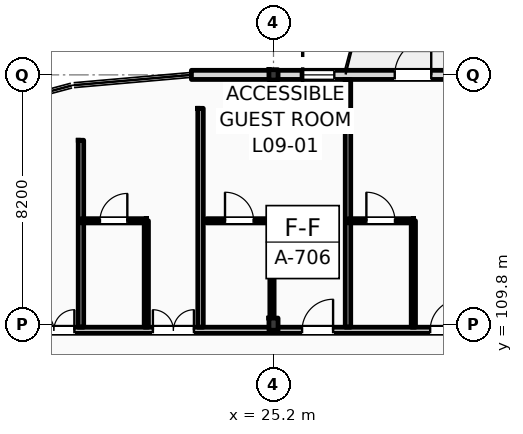
"""IFC4 building model, lengths in metres.
Left out: names, types, materials, properties, quantities, classifications, styles, units other than length and angle.
Written with IfcOpenShell. Run it as: python <this file> out.ifc"""

import sys

from ifc_helpers import new_model, si_unit, direction, frame, frame_2d, origin, origin_2d, place, context, subcontext, project, spatial, rectangle, i_section, extrude, element, fill, save


model = new_model("IFC4")
c1 = context("Model", 3, precision=1e-05, world=origin(), true_north=direction((0.0, 1.0)))
c2 = subcontext(c1, "Body", "Model", "MODEL_VIEW")
j1 = project(units=[si_unit("LENGTHUNIT", "METRE"), si_unit("PLANEANGLEUNIT", "RADIAN")], contexts=[c1])
p1 = place(None, origin())
s1 = spatial("IfcSite", under=j1, at=p1, CompositionType="ELEMENT")
p2 = place(p1, origin())
s2 = spatial("IfcBuilding", under=s1, at=p2, CompositionType="ELEMENT")
p3 = place(p2, frame((0.0, 0.0, 39.0)))
s3 = spatial("IfcBuildingStorey", under=s2, at=p3, CompositionType="ELEMENT", Elevation=39.0)
p4 = place(p3, frame((25.2, 109.8, 0.0), z_axis=(0.0, 0.0, 1.0), x_axis=(1.0, 0.0, 0.0)))
e1 = element("IfcColumn", 1, at=p4, inside=s3, PredefinedType="COLUMN", context=c2, shape_type="SweptSolid", body=[
    extrude(i_section(OverallWidth=0.3, OverallDepth=0.4, WebThickness=0.013, FlangeThickness=0.024, FilletRadius=0.027, at=origin_2d()), origin(), (0.0, 0.0, 1.0), 3.6),
])
p5 = place(p3, frame((25.2, 118.0, 0.0), z_axis=(0.0, 0.0, 1.0), x_axis=(1.0, 0.0, 0.0)))
e2 = element("IfcColumn", 2, at=p5, inside=s3, PredefinedType="COLUMN", context=c2, shape_type="SweptSolid", body=[
    extrude(i_section(OverallWidth=0.3, OverallDepth=0.34, WebThickness=0.012, FlangeThickness=0.021, FilletRadius=0.027, at=origin_2d()), origin(), (0.0, 0.0, 1.0), 3.6),
])
p6 = place(p3, frame((22.5, 118.0, 0.0), z_axis=(0.0, 0.0, 1.0), x_axis=(1.0, 0.0, 0.0)))
e3 = element("IfcWall", 3, at=p6, inside=s3, PredefinedType="STANDARD", context=c2, shape_type="SweptSolid", body=[
    extrude(rectangle(XDim=72.9, YDim=0.3, at=frame_2d((36.45, 0.0))), origin(), (0.0, 0.0, 1.0), 2.92),
])
p7 = place(p6, frame((3.6, 0.0, 0.9)))
e4 = element("IfcOpeningElement", 4, at=p7, cuts=e3, PredefinedType="OPENING", context=c2, shape_type="SweptSolid", body=[
    extrude(rectangle(XDim=1.1, YDim=1.6, at=frame_2d((0.55, 0.8))), frame((0.0, 0.16, 0.0), z_axis=(0.0, -1.0, 0.0), x_axis=(1.0, 0.0, 0.0)), (0.0, 0.0, 1.0), 0.32),
])
p8 = place(p6, frame((6.688, 0.0, 0.0)))
e5 = element("IfcOpeningElement", 5, at=p8, cuts=e3, PredefinedType="OPENING", context=c2, shape_type="SweptSolid", body=[
    extrude(rectangle(XDim=1.2, YDim=2.25, at=frame_2d((0.6, 1.125))), frame((0.0, 0.16, 0.0), z_axis=(0.0, -1.0, 0.0), x_axis=(1.0, 0.0, 0.0)), (0.0, 0.0, 1.0), 0.32),
])
p9 = place(p6, frame((11.388, 0.0, 0.9)))
e6 = element("IfcOpeningElement", 6, at=p9, cuts=e3, PredefinedType="OPENING", context=c2, shape_type="SweptSolid", body=[
    extrude(rectangle(XDim=1.6, YDim=1.75, at=frame_2d((0.8, 0.875))), frame((0.0, 0.16, 0.0), z_axis=(0.0, -1.0, 0.0), x_axis=(1.0, 0.0, 0.0)), (0.0, 0.0, 1.0), 0.32),
])
p10 = place(p6, frame((15.413, 0.0, 0.9)))
e7 = element("IfcOpeningElement", 7, at=p10, cuts=e3, PredefinedType="OPENING", context=c2, shape_type="SweptSolid", body=[
    extrude(rectangle(XDim=1.75, YDim=1.84, at=frame_2d((0.875, 0.92))), frame((0.0, 0.16, 0.0), z_axis=(0.0, -1.0, 0.0), x_axis=(1.0, 0.0, 0.0)), (0.0, 0.0, 1.0), 0.32),
])
p11 = place(p6, frame((21.245, 0.0, 0.0)))
e8 = element("IfcOpeningElement", 8, at=p11, cuts=e3, PredefinedType="OPENING", context=c2, shape_type="SweptSolid", body=[
    extrude(rectangle(XDim=1.2, YDim=2.25, at=frame_2d((0.6, 1.125))), frame((0.0, 0.16, 0.0), z_axis=(0.0, -1.0, 0.0), x_axis=(1.0, 0.0, 0.0)), (0.0, 0.0, 1.0), 0.32),
])
p12 = place(p6, frame((23.705, 0.0, 0.0)))
e9 = element("IfcOpeningElement", 9, at=p12, cuts=e3, PredefinedType="OPENING", context=c2, shape_type="SweptSolid", body=[
    extrude(rectangle(XDim=1.2, YDim=2.25, at=frame_2d((0.6, 1.125))), frame((0.0, 0.16, 0.0), z_axis=(0.0, -1.0, 0.0), x_axis=(1.0, 0.0, 0.0)), (0.0, 0.0, 1.0), 0.32),
])
p13 = place(p6, frame((28.488, 0.0, 0.9)))
e10 = element("IfcOpeningElement", 10, at=p13, cuts=e3, PredefinedType="OPENING", context=c2, shape_type="SweptSolid", body=[
    extrude(rectangle(XDim=2.6, YDim=1.84, at=frame_2d((1.3, 0.92))), frame((0.0, 0.16, 0.0), z_axis=(0.0, -1.0, 0.0), x_axis=(1.0, 0.0, 0.0)), (0.0, 0.0, 1.0), 0.32),
])
p14 = place(p6, frame((34.76, 0.0, 0.9)))
e11 = element("IfcOpeningElement", 11, at=p14, cuts=e3, PredefinedType="OPENING", context=c2, shape_type="SweptSolid", body=[
    extrude(rectangle(XDim=1.1, YDim=1.84, at=frame_2d((0.55, 0.92))), frame((0.0, 0.16, 0.0), z_axis=(0.0, -1.0, 0.0), x_axis=(1.0, 0.0, 0.0)), (0.0, 0.0, 1.0), 0.32),
])
p15 = place(p6, frame((38.143, 0.0, 0.0)))
e12 = element("IfcOpeningElement", 12, at=p15, cuts=e3, PredefinedType="OPENING", context=c2, shape_type="SweptSolid", body=[
    extrude(rectangle(XDim=1.2, YDim=2.25, at=frame_2d((0.6, 1.125))), frame((0.0, 0.16, 0.0), z_axis=(0.0, -1.0, 0.0), x_axis=(1.0, 0.0, 0.0)), (0.0, 0.0, 1.0), 0.32),
])
p16 = place(p6, frame((42.687, 0.0, 0.9)))
e13 = element("IfcOpeningElement", 13, at=p16, cuts=e3, PredefinedType="OPENING", context=c2, shape_type="SweptSolid", body=[
    extrude(rectangle(XDim=1.2, YDim=1.8, at=frame_2d((0.6, 0.9))), frame((0.0, 0.16, 0.0), z_axis=(0.0, -1.0, 0.0), x_axis=(1.0, 0.0, 0.0)), (0.0, 0.0, 1.0), 0.32),
])
p17 = place(p6, frame((47.112, 0.0, 0.9)))
e14 = element("IfcOpeningElement", 14, at=p17, cuts=e3, PredefinedType="OPENING", context=c2, shape_type="SweptSolid", body=[
    extrude(rectangle(XDim=1.35, YDim=1.84, at=frame_2d((0.675, 0.92))), frame((0.0, 0.16, 0.0), z_axis=(0.0, -1.0, 0.0), x_axis=(1.0, 0.0, 0.0)), (0.0, 0.0, 1.0), 0.32),
])
p18 = place(p6, frame((52.482, 0.0, 0.0)))
e15 = element("IfcOpeningElement", 15, at=p18, cuts=e3, PredefinedType="OPENING", context=c2, shape_type="SweptSolid", body=[
    extrude(rectangle(XDim=1.2, YDim=2.25, at=frame_2d((0.6, 1.125))), frame((0.0, 0.16, 0.0), z_axis=(0.0, -1.0, 0.0), x_axis=(1.0, 0.0, 0.0)), (0.0, 0.0, 1.0), 0.32),
])
p19 = place(p6, frame((54.942, 0.0, 0.0)))
e16 = element("IfcOpeningElement", 16, at=p19, cuts=e3, PredefinedType="OPENING", context=c2, shape_type="SweptSolid", body=[
    extrude(rectangle(XDim=1.2, YDim=2.25, at=frame_2d((0.6, 1.125))), frame((0.0, 0.16, 0.0), z_axis=(0.0, -1.0, 0.0), x_axis=(1.0, 0.0, 0.0)), (0.0, 0.0, 1.0), 0.32),
])
p20 = place(p6, frame((60.387, 0.0, 0.9)))
e17 = element("IfcOpeningElement", 17, at=p20, cuts=e3, PredefinedType="OPENING", context=c2, shape_type="SweptSolid", body=[
    extrude(rectangle(XDim=1.8, YDim=1.84, at=frame_2d((0.9, 0.92))), frame((0.0, 0.16, 0.0), z_axis=(0.0, -1.0, 0.0), x_axis=(1.0, 0.0, 0.0)), (0.0, 0.0, 1.0), 0.32),
])
p21 = place(p6, frame((66.013, 0.0, 0.9)))
e18 = element("IfcOpeningElement", 18, at=p21, cuts=e3, PredefinedType="OPENING", context=c2, shape_type="SweptSolid", body=[
    extrude(rectangle(XDim=1.35, YDim=1.84, at=frame_2d((0.675, 0.92))), frame((0.0, 0.16, 0.0), z_axis=(0.0, -1.0, 0.0), x_axis=(1.0, 0.0, 0.0)), (0.0, 0.0, 1.0), 0.32),
])
p22 = place(p6, frame((69.275, 0.0, 0.9)))
e19 = element("IfcOpeningElement", 19, at=p22, cuts=e3, PredefinedType="OPENING", context=c2, shape_type="SweptSolid", body=[
    extrude(rectangle(XDim=2.1, YDim=1.84, at=frame_2d((1.05, 0.92))), frame((0.0, 0.16, 0.0), z_axis=(0.0, -1.0, 0.0), x_axis=(1.0, 0.0, 0.0)), (0.0, 0.0, 1.0), 0.32),
])
p23 = place(p3, frame((10.65, 109.6, 0.0), z_axis=(0.0, 0.0, 1.0), x_axis=(1.0, 0.0, 0.0)))
e20 = element("IfcWall", 20, at=p23, inside=s3, PredefinedType="PARTITIONING", context=c2, shape_type="SweptSolid", body=[
    extrude(rectangle(XDim=84.61, YDim=0.2, at=frame_2d((42.305, 0.0))), origin(), (0.0, 0.0, 1.0), 2.82),
])
p24 = place(p23, frame((15.49, 0.0, 0.0)))
e21 = element("IfcOpeningElement", 21, at=p24, cuts=e20, PredefinedType="OPENING", context=c2, shape_type="SweptSolid", body=[
    extrude(rectangle(XDim=1.02, YDim=2.2, at=frame_2d((0.51, 1.1))), frame((0.0, 0.11, 0.0), z_axis=(0.0, -1.0, 0.0), x_axis=(1.0, 0.0, 0.0)), (0.0, 0.0, 1.0), 0.22),
])
p25 = place(p23, frame((19.703, 0.0, 0.0)))
e22 = element("IfcOpeningElement", 22, at=p25, cuts=e20, PredefinedType="OPENING", context=c2, shape_type="SweptSolid", body=[
    extrude(rectangle(XDim=1.02, YDim=2.2, at=frame_2d((0.51, 1.1))), frame((0.0, 0.11, 0.0), z_axis=(0.0, -1.0, 0.0), x_axis=(1.0, 0.0, 0.0)), (0.0, 0.0, 1.0), 0.22),
])
p26 = place(p23, frame((24.203, 0.0, 0.0)))
e23 = element("IfcOpeningElement", 23, at=p26, cuts=e20, PredefinedType="OPENING", context=c2, shape_type="SweptSolid", body=[
    extrude(rectangle(XDim=1.02, YDim=2.2, at=frame_2d((0.51, 1.1))), frame((0.0, 0.11, 0.0), z_axis=(0.0, -1.0, 0.0), x_axis=(1.0, 0.0, 0.0)), (0.0, 0.0, 1.0), 0.22),
])
p27 = place(p23, frame((26.552, 0.0, 0.0)))
e24 = element("IfcOpeningElement", 24, at=p27, cuts=e20, PredefinedType="OPENING", context=c2, shape_type="SweptSolid", body=[
    extrude(rectangle(XDim=1.02, YDim=2.2, at=frame_2d((0.51, 1.1))), frame((0.0, 0.11, 0.0), z_axis=(0.0, -1.0, 0.0), x_axis=(1.0, 0.0, 0.0)), (0.0, 0.0, 1.0), 0.22),
])
p28 = place(p23, frame((33.233, 0.0, 0.0)))
e25 = element("IfcOpeningElement", 25, at=p28, cuts=e20, PredefinedType="OPENING", context=c2, shape_type="SweptSolid", body=[
    extrude(rectangle(XDim=0.96, YDim=2.2, at=frame_2d((0.48, 1.1))), frame((0.0, 0.11, 0.0), z_axis=(0.0, -1.0, 0.0), x_axis=(1.0, 0.0, 0.0)), (0.0, 0.0, 1.0), 0.22),
])
p29 = place(p23, frame((35.583, 0.0, 0.0)))
e26 = element("IfcOpeningElement", 26, at=p29, cuts=e20, PredefinedType="OPENING", context=c2, shape_type="SweptSolid", body=[
    extrude(rectangle(XDim=0.96, YDim=2.2, at=frame_2d((0.48, 1.1))), frame((0.0, 0.11, 0.0), z_axis=(0.0, -1.0, 0.0), x_axis=(1.0, 0.0, 0.0)), (0.0, 0.0, 1.0), 0.22),
])
p30 = place(p23, frame((42.233, 0.0, 0.0)))
e27 = element("IfcOpeningElement", 27, at=p30, cuts=e20, PredefinedType="OPENING", context=c2, shape_type="SweptSolid", body=[
    extrude(rectangle(XDim=0.96, YDim=2.2, at=frame_2d((0.48, 1.1))), frame((0.0, 0.11, 0.0), z_axis=(0.0, -1.0, 0.0), x_axis=(1.0, 0.0, 0.0)), (0.0, 0.0, 1.0), 0.22),
])
p31 = place(p23, frame((46.983, 0.0, 0.0)))
e28 = element("IfcOpeningElement", 28, at=p31, cuts=e20, PredefinedType="OPENING", context=c2, shape_type="SweptSolid", body=[
    extrude(rectangle(XDim=0.96, YDim=2.2, at=frame_2d((0.48, 1.1))), frame((0.0, 0.11, 0.0), z_axis=(0.0, -1.0, 0.0), x_axis=(1.0, 0.0, 0.0)), (0.0, 0.0, 1.0), 0.22),
])
p32 = place(p23, frame((51.233, 0.0, 0.0)))
e29 = element("IfcOpeningElement", 29, at=p32, cuts=e20, PredefinedType="OPENING", context=c2, shape_type="SweptSolid", body=[
    extrude(rectangle(XDim=0.96, YDim=2.2, at=frame_2d((0.48, 1.1))), frame((0.0, 0.11, 0.0), z_axis=(0.0, -1.0, 0.0), x_axis=(1.0, 0.0, 0.0)), (0.0, 0.0, 1.0), 0.22),
])
p33 = place(p23, frame((55.733, 0.0, 0.0)))
e30 = element("IfcOpeningElement", 30, at=p33, cuts=e20, PredefinedType="OPENING", context=c2, shape_type="SweptSolid", body=[
    extrude(rectangle(XDim=0.96, YDim=2.2, at=frame_2d((0.48, 1.1))), frame((0.0, 0.11, 0.0), z_axis=(0.0, -1.0, 0.0), x_axis=(1.0, 0.0, 0.0)), (0.0, 0.0, 1.0), 0.22),
])
p34 = place(p23, frame((58.083, 0.0, 0.0)))
e31 = element("IfcOpeningElement", 31, at=p34, cuts=e20, PredefinedType="OPENING", context=c2, shape_type="SweptSolid", body=[
    extrude(rectangle(XDim=0.96, YDim=2.2, at=frame_2d((0.48, 1.1))), frame((0.0, 0.11, 0.0), z_axis=(0.0, -1.0, 0.0), x_axis=(1.0, 0.0, 0.0)), (0.0, 0.0, 1.0), 0.22),
])
p35 = place(p23, frame((64.732, 0.0, 0.0)))
e32 = element("IfcOpeningElement", 32, at=p35, cuts=e20, PredefinedType="OPENING", context=c2, shape_type="SweptSolid", body=[
    extrude(rectangle(XDim=0.96, YDim=2.2, at=frame_2d((0.48, 1.1))), frame((0.0, 0.11, 0.0), z_axis=(0.0, -1.0, 0.0), x_axis=(1.0, 0.0, 0.0)), (0.0, 0.0, 1.0), 0.22),
])
p36 = place(p23, frame((66.832, 0.0, 0.0)))
e33 = element("IfcOpeningElement", 33, at=p36, cuts=e20, PredefinedType="OPENING", context=c2, shape_type="SweptSolid", body=[
    extrude(rectangle(XDim=0.96, YDim=2.2, at=frame_2d((0.48, 1.1))), frame((0.0, 0.11, 0.0), z_axis=(0.0, -1.0, 0.0), x_axis=(1.0, 0.0, 0.0)), (0.0, 0.0, 1.0), 0.22),
])
p37 = place(p23, frame((73.732, 0.0, 0.0)))
e34 = element("IfcOpeningElement", 34, at=p37, cuts=e20, PredefinedType="OPENING", context=c2, shape_type="SweptSolid", body=[
    extrude(rectangle(XDim=0.96, YDim=2.2, at=frame_2d((0.48, 1.1))), frame((0.0, 0.11, 0.0), z_axis=(0.0, -1.0, 0.0), x_axis=(1.0, 0.0, 0.0)), (0.0, 0.0, 1.0), 0.22),
])
p38 = place(p23, frame((78.233, 0.0, 0.0)))
e35 = element("IfcOpeningElement", 35, at=p38, cuts=e20, PredefinedType="OPENING", context=c2, shape_type="SweptSolid", body=[
    extrude(rectangle(XDim=0.96, YDim=2.2, at=frame_2d((0.48, 1.1))), frame((0.0, 0.11, 0.0), z_axis=(0.0, -1.0, 0.0), x_axis=(1.0, 0.0, 0.0)), (0.0, 0.0, 1.0), 0.22),
])
p39 = place(p23, frame((80.62, 0.0, 0.0)))
e36 = element("IfcOpeningElement", 36, at=p39, cuts=e20, PredefinedType="OPENING", context=c2, shape_type="SweptSolid", body=[
    extrude(rectangle(XDim=0.96, YDim=2.2, at=frame_2d((0.48, 1.1))), frame((0.0, 0.11, 0.0), z_axis=(0.0, -1.0, 0.0), x_axis=(1.0, 0.0, 0.0)), (0.0, 0.0, 1.0), 0.22),
])
p40 = place(p23, frame((2.716, 0.0, 0.0)))
e37 = element("IfcOpeningElement", 37, at=p40, cuts=e20, PredefinedType="OPENING", context=c2, shape_type="SweptSolid", body=[
    extrude(rectangle(XDim=1.35, YDim=2.25, at=frame_2d((0.675, 1.125))), frame((0.0, 0.11, 0.0), z_axis=(0.0, -1.0, 0.0), x_axis=(1.0, 0.0, 0.0)), (0.0, 0.0, 1.0), 0.22),
])
p41 = place(p23, frame((6.65, 0.0, 0.0)))
e38 = element("IfcOpeningElement", 38, at=p41, cuts=e20, PredefinedType="OPENING", context=c2, shape_type="SweptSolid", body=[
    extrude(rectangle(XDim=1.35, YDim=2.25, at=frame_2d((0.675, 1.125))), frame((0.0, 0.11, 0.0), z_axis=(0.0, -1.0, 0.0), x_axis=(1.0, 0.0, 0.0)), (0.0, 0.0, 1.0), 0.22),
])
p42 = place(p23, frame((10.583, 0.0, 0.0)))
e39 = element("IfcOpeningElement", 39, at=p42, cuts=e20, PredefinedType="OPENING", context=c2, shape_type="SweptSolid", body=[
    extrude(rectangle(XDim=1.35, YDim=2.25, at=frame_2d((0.675, 1.125))), frame((0.0, 0.11, 0.0), z_axis=(0.0, -1.0, 0.0), x_axis=(1.0, 0.0, 0.0)), (0.0, 0.0, 1.0), 0.22),
])
p43 = place(p3, frame((27.65, 109.7, 0.0), z_axis=(0.0, 0.0, 1.0), x_axis=(0.0, 1.0, 0.0)))
e40 = element("IfcWall", 40, at=p43, inside=s3, PredefinedType="PARTITIONING", context=c2, shape_type="SweptSolid", body=[
    extrude(rectangle(XDim=8.15, YDim=0.18, at=frame_2d((4.075, 0.0))), origin(), (0.0, 0.0, 1.0), 3.07),
])
p44 = place(p3, frame((25.15, 109.7, 0.0), z_axis=(0.0, 0.0, 1.0), x_axis=(0.0, 1.0, 0.0)))
e41 = element("IfcWall", 41, at=p44, inside=s3, PredefinedType="PARTITIONING", context=c2, shape_type="SweptSolid", body=[
    extrude(rectangle(XDim=3.5, YDim=0.14, at=frame_2d((1.75, 0.0))), origin(), (0.0, 0.0, 1.0), 3.01),
])
p45 = place(p3, frame((23.0, 113.2, 0.0), z_axis=(0.0, 0.0, 1.0), x_axis=(1.0, 0.0, 0.0)))
e42 = element("IfcWall", 42, at=p45, inside=s3, PredefinedType="PARTITIONING", context=c2, shape_type="SweptSolid", body=[
    extrude(rectangle(XDim=2.15, YDim=0.14, at=frame_2d((1.075, 0.0))), origin(), (0.0, 0.0, 1.0), 3.38),
])
p46 = place(p45, frame((0.605, 0.0, 0.0)))
e43 = element("IfcOpeningElement", 43, at=p46, cuts=e42, PredefinedType="OPENING", context=c2, shape_type="SweptSolid", body=[
    extrude(rectangle(XDim=0.94, YDim=2.15, at=frame_2d((0.47, 1.075))), frame((0.0, 0.08, 0.0), z_axis=(0.0, -1.0, 0.0), x_axis=(1.0, 0.0, 0.0)), (0.0, 0.0, 1.0), 0.16),
])
p47 = place(p3, frame((29.8, 109.7, 0.0), z_axis=(0.0, 0.0, 1.0), x_axis=(0.0, 1.0, 0.0)))
e44 = element("IfcWall", 44, at=p47, inside=s3, PredefinedType="PARTITIONING", context=c2, shape_type="SweptSolid", body=[
    extrude(rectangle(XDim=3.5, YDim=0.14, at=frame_2d((1.75, 0.0))), origin(), (0.0, 0.0, 1.0), 3.38),
])
p48 = place(p3, frame((27.65, 113.2, 0.0), z_axis=(0.0, 0.0, 1.0), x_axis=(1.0, 0.0, 0.0)))
e45 = element("IfcWall", 45, at=p48, inside=s3, PredefinedType="PARTITIONING", context=c2, shape_type="SweptSolid", body=[
    extrude(rectangle(XDim=2.15, YDim=0.14, at=frame_2d((1.075, 0.0))), origin(), (0.0, 0.0, 1.0), 3.38),
])
p49 = place(p48, frame((0.605, 0.0, 0.0)))
e46 = element("IfcOpeningElement", 46, at=p49, cuts=e45, PredefinedType="OPENING", context=c2, shape_type="SweptSolid", body=[
    extrude(rectangle(XDim=0.94, YDim=2.15, at=frame_2d((0.47, 1.075))), frame((0.0, 0.08, 0.0), z_axis=(0.0, -1.0, 0.0), x_axis=(1.0, 0.0, 0.0)), (0.0, 0.0, 1.0), 0.16),
])
p50 = place(p3, frame((18.867, 109.7, 0.0), z_axis=(0.0, 0.0, 1.0), x_axis=(0.0, 1.0, 0.0)))
e47 = element("IfcWall", 47, at=p50, inside=s3, PredefinedType="PARTITIONING", context=c2, shape_type="SweptSolid", body=[
    extrude(rectangle(XDim=6.15, YDim=0.18, at=frame_2d((3.075, 0.0))), origin(), (0.0, 0.0, 1.0), 3.38),
])
p51 = place(p3, frame((22.8, 109.7, 0.0), z_axis=(0.0, 0.0, 1.0), x_axis=(0.0, 1.0, 0.0)))
e48 = element("IfcWall", 48, at=p51, inside=s3, PredefinedType="PARTITIONING", context=c2, shape_type="SweptSolid", body=[
    extrude(rectangle(XDim=7.2, YDim=0.18, at=frame_2d((3.6, 0.0))), origin(), (0.0, 0.0, 1.0), 3.38),
])
p52 = place(p3, frame((21.017, 109.7, 0.0), z_axis=(0.0, 0.0, 1.0), x_axis=(0.0, 1.0, 0.0)))
e49 = element("IfcWall", 49, at=p52, inside=s3, PredefinedType="PARTITIONING", context=c2, shape_type="SweptSolid", body=[
    extrude(rectangle(XDim=3.5, YDim=0.14, at=frame_2d((1.75, 0.0))), origin(), (0.0, 0.0, 1.0), 3.38),
])
p53 = place(p3, frame((18.867, 113.2, 0.0), z_axis=(0.0, 0.0, 1.0), x_axis=(1.0, 0.0, 0.0)))
e50 = element("IfcWall", 50, at=p53, inside=s3, PredefinedType="PARTITIONING", context=c2, shape_type="SweptSolid", body=[
    extrude(rectangle(XDim=2.15, YDim=0.14, at=frame_2d((1.075, 0.0))), origin(), (0.0, 0.0, 1.0), 3.38),
])
p54 = place(p53, frame((0.625, 0.0, 0.0)))
e51 = element("IfcOpeningElement", 51, at=p54, cuts=e50, PredefinedType="OPENING", context=c2, shape_type="SweptSolid", body=[
    extrude(rectangle(XDim=0.9, YDim=2.1, at=frame_2d((0.45, 1.05))), frame((0.0, 0.08, 0.0), z_axis=(0.0, -1.0, 0.0), x_axis=(1.0, 0.0, 0.0)), (0.0, 0.0, 1.0), 0.16),
])
p55 = place(p7, origin())
e52 = element("IfcWindow", 52, at=p55, inside=s3, PartitioningType="DOUBLE_PANEL_VERTICAL", PredefinedType="WINDOW", context=c2, shape_type="SweptSolid", body=[
    extrude(rectangle(XDim=1.1, YDim=1.6, at=frame_2d((0.55, 0.8))), frame((0.0, 0.03, 0.0), z_axis=(0.0, -1.0, 0.0), x_axis=(1.0, 0.0, 0.0)), (0.0, 0.0, 1.0), 0.06),
])
fill(e4, e52)
p56 = place(p8, origin())
e53 = element("IfcDoor", 53, at=p56, inside=s3, OperationType="SINGLE_SWING_RIGHT", PredefinedType="DOOR", context=c2, shape_type="SweptSolid", body=[
    extrude(rectangle(XDim=1.2, YDim=2.25, at=frame_2d((0.6, 1.125))), frame((0.0, 0.025, 0.0), z_axis=(0.0, -1.0, 0.0), x_axis=(1.0, 0.0, 0.0)), (0.0, 0.0, 1.0), 0.05),
])
fill(e5, e53)
p57 = place(p24, origin())
e54 = element("IfcDoor", 54, at=p57, inside=s3, OperationType="SINGLE_SWING_RIGHT", PredefinedType="DOOR", context=c2, shape_type="SweptSolid", body=[
    extrude(rectangle(XDim=1.02, YDim=2.2, at=frame_2d((0.51, 1.1))), frame((0.0, 0.025, 0.0), z_axis=(0.0, -1.0, 0.0), x_axis=(1.0, 0.0, 0.0)), (0.0, 0.0, 1.0), 0.05),
])
fill(e21, e54)
p58 = place(p46, origin())
e55 = element("IfcDoor", 55, at=p58, inside=s3, OperationType="SINGLE_SWING_LEFT", PredefinedType="DOOR", context=c2, shape_type="SweptSolid", body=[
    extrude(rectangle(XDim=0.94, YDim=2.15, at=frame_2d((0.47, 1.075))), frame((0.0, 0.025, 0.0), z_axis=(0.0, -1.0, 0.0), x_axis=(1.0, 0.0, 0.0)), (0.0, 0.0, 1.0), 0.05),
])
fill(e43, e55)
p59 = place(p25, origin())
e56 = element("IfcDoor", 56, at=p59, inside=s3, OperationType="SINGLE_SWING_RIGHT", PredefinedType="DOOR", context=c2, shape_type="SweptSolid", body=[
    extrude(rectangle(XDim=1.02, YDim=2.2, at=frame_2d((0.51, 1.1))), frame((0.0, 0.025, 0.0), z_axis=(0.0, -1.0, 0.0), x_axis=(1.0, 0.0, 0.0)), (0.0, 0.0, 1.0), 0.05),
])
fill(e22, e56)
p60 = place(p49, origin())
e57 = element("IfcDoor", 57, at=p60, inside=s3, OperationType="SINGLE_SWING_LEFT", PredefinedType="DOOR", context=c2, shape_type="SweptSolid", body=[
    extrude(rectangle(XDim=0.94, YDim=2.15, at=frame_2d((0.47, 1.075))), frame((0.0, 0.025, 0.0), z_axis=(0.0, -1.0, 0.0), x_axis=(1.0, 0.0, 0.0)), (0.0, 0.0, 1.0), 0.05),
])
fill(e46, e57)
p61 = place(p41, origin())
e58 = element("IfcDoor", 58, at=p61, inside=s3, OperationType="DOUBLE_SWING_LEFT", PredefinedType="DOOR", context=c2, shape_type="SweptSolid", body=[
    extrude(rectangle(XDim=1.35, YDim=2.25, at=frame_2d((0.675, 1.125))), frame((0.0, 0.025, 0.0), z_axis=(0.0, -1.0, 0.0), x_axis=(1.0, 0.0, 0.0)), (0.0, 0.0, 1.0), 0.05),
])
fill(e38, e58)
p62 = place(p42, origin())
e59 = element("IfcDoor", 59, at=p62, inside=s3, OperationType="DOUBLE_SWING_LEFT", PredefinedType="DOOR", context=c2, shape_type="SweptSolid", body=[
    extrude(rectangle(XDim=1.35, YDim=2.25, at=frame_2d((0.675, 1.125))), frame((0.0, 0.025, 0.0), z_axis=(0.0, -1.0, 0.0), x_axis=(1.0, 0.0, 0.0)), (0.0, 0.0, 1.0), 0.05),
])
fill(e39, e59)
p63 = place(p54, origin())
e60 = element("IfcDoor", 60, at=p63, inside=s3, OperationType="SINGLE_SWING_RIGHT", PredefinedType="DOOR", context=c2, shape_type="SweptSolid", body=[
    extrude(rectangle(XDim=0.9, YDim=2.1, at=frame_2d((0.45, 1.05))), frame((0.0, 0.025, 0.0), z_axis=(0.0, -1.0, 0.0), x_axis=(1.0, 0.0, 0.0)), (0.0, 0.0, 1.0), 0.05),
])
fill(e51, e60)
save(model, sys.argv[1])
